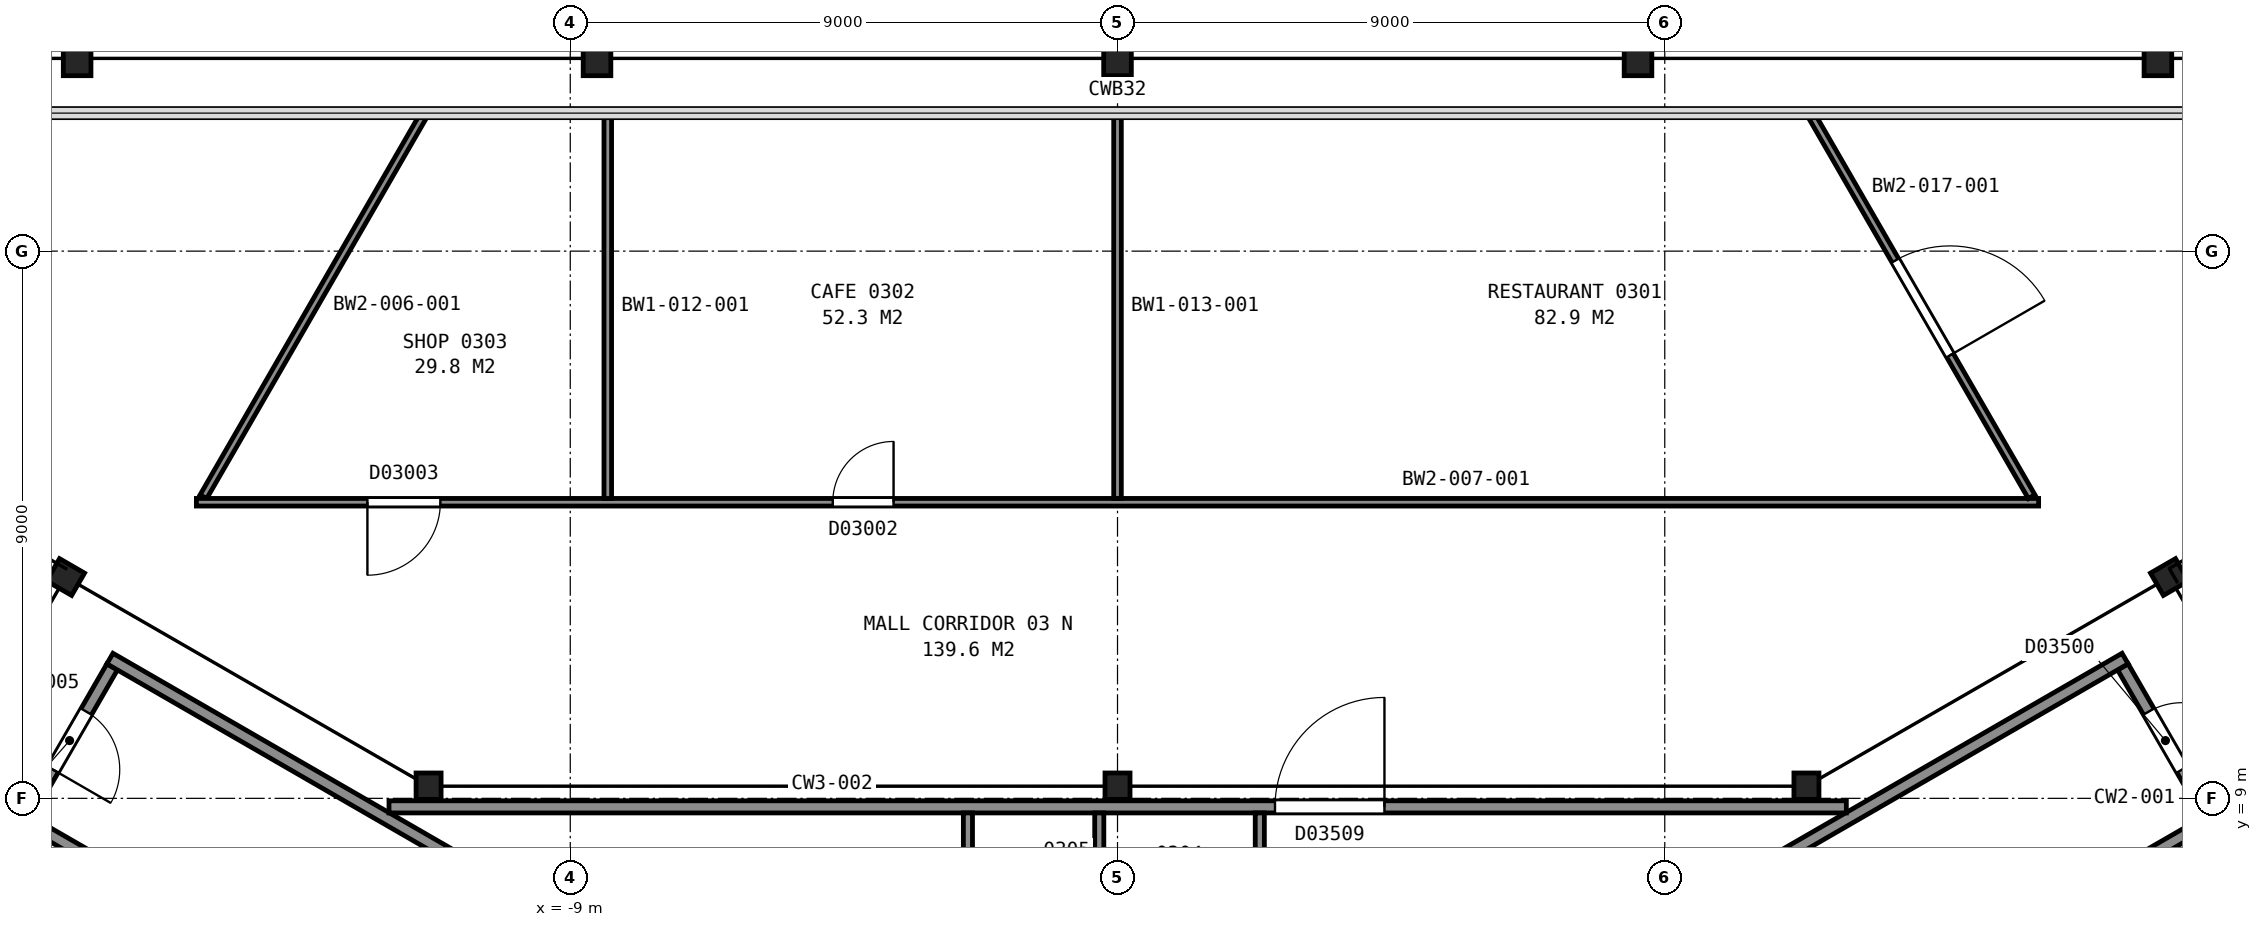
"""IFC4 building model, lengths in metres.
Left out: names, types, materials, properties, quantities, classifications, styles, units other than length and angle.
Written with IfcOpenShell. Run it as: python <this file> out.ifc"""

import sys

from ifc_helpers import new_model, si_unit, direction, frame, frame_2d, origin, origin_2d, place, context, subcontext, project, spatial, rectangle, i_section, extrude, element, fill, save


model = new_model("IFC4")
c1 = context("Model", 3, precision=1e-05, world=origin(), true_north=direction((0.0, 1.0)))
c2 = subcontext(c1, "Body", "Model", "MODEL_VIEW")
j1 = project(units=[si_unit("LENGTHUNIT", "METRE"), si_unit("PLANEANGLEUNIT", "RADIAN")], contexts=[c1])
p1 = place(None, origin())
s1 = spatial("IfcSite", under=j1, at=p1, CompositionType="ELEMENT")
p2 = place(p1, origin())
s2 = spatial("IfcBuilding", under=s1, at=p2, CompositionType="ELEMENT")
p3 = place(p2, frame((0.0, 0.0, 22.4)))
s3 = spatial("IfcBuildingStorey", under=s2, at=p3, CompositionType="ELEMENT", Elevation=22.4)
for number, where, z_axis, x_axis in (
    (1, (17.11, 21.17, 0.0), (0.0, 0.0, 1.0), (1.0, 0.0, 0.0)),
    (2, (8.56, 21.17, 0.0), (0.0, 0.0, 1.0), (1.0, 0.0, 0.0)),
    (3, (0.0, 21.17, 0.0), (0.0, 0.0, 1.0), (1.0, 0.0, 0.0)),
    (4, (-8.56, 21.17, 0.0), (0.0, 0.0, 1.0), (1.0, 0.0, 0.0)),
    (5, (-17.11, 21.17, 0.0), (0.0, 0.0, 1.0), (1.0, 0.0, 0.0)),
):
    element("IfcColumn", number, at=place(p3, frame(where, z_axis=z_axis, x_axis=x_axis)), inside=s3, PredefinedType="COLUMN", context=c2, shape_type="SweptSolid", body=[
        extrude(i_section(OverallWidth=0.455, OverallDepth=0.569, WebThickness=0.078, FlangeThickness=0.125, FilletRadius=0.015, at=origin_2d()), origin(), (0.0, 0.0, 1.0), 4.8),
    ])
p4 = place(p3, frame((17.3, 12.64, 0.0), z_axis=(0.0, 0.0, 1.0), x_axis=(0.5, -0.866025403784, 0.0)))
e6 = element("IfcColumn", 6, at=p4, inside=s3, PredefinedType="COLUMN", context=c2, shape_type="SweptSolid", body=[
    extrude(i_section(OverallWidth=0.424, OverallDepth=0.475, WebThickness=0.048, FlangeThickness=0.077, FilletRadius=0.015, at=origin_2d()), origin(), (0.0, 0.0, 1.0), 4.8),
])
for number, where, z_axis, x_axis in (
    (7, (11.33, 9.2, 0.0), (0.0, 0.0, 1.0), (1.0, 0.0, 0.0)),
    (8, (0.0, 9.2, 0.0), (0.0, 0.0, 1.0), (1.0, 0.0, 0.0)),
    (9, (-11.33, 9.2, 0.0), (0.0, 0.0, 1.0), (1.0, 0.0, 0.0)),
):
    element("IfcColumn", number, at=place(p3, frame(where, z_axis=z_axis, x_axis=x_axis)), inside=s3, PredefinedType="COLUMN", context=c2, shape_type="SweptSolid", body=[
        extrude(i_section(OverallWidth=0.411, OverallDepth=0.434, WebThickness=0.036, FlangeThickness=0.057, FilletRadius=0.015, at=origin_2d()), origin(), (0.0, 0.0, 1.0), 4.8),
    ])
p5 = place(p3, frame((-17.3, 12.64, 0.0), z_axis=(0.0, 0.0, 1.0), x_axis=(0.5, 0.866025403784, 0.0)))
e10 = element("IfcColumn", 10, at=p5, inside=s3, PredefinedType="COLUMN", context=c2, shape_type="SweptSolid", body=[
    extrude(i_section(OverallWidth=0.424, OverallDepth=0.475, WebThickness=0.048, FlangeThickness=0.077, FilletRadius=0.015, at=origin_2d()), origin(), (0.0, 0.0, 1.0), 4.8),
])
p6 = place(p3, frame((17.934, 8.738, 0.0), z_axis=(0.0, 0.0, 1.0), x_axis=(-0.49998411664, 0.866034573852, 0.0)))
e11 = element("IfcWall", 11, at=p6, inside=s3, PredefinedType="PARTITIONING", context=c2, shape_type="SweptSolid", body=[
    extrude(rectangle(XDim=2.8, YDim=0.2, at=frame_2d((1.4, 0.0))), origin(), (0.0, 0.0, 1.0), 4.55),
])
p7 = place(p6, frame((0.85, 0.0, 0.0)))
e12 = element("IfcOpeningElement", 12, at=p7, cuts=e11, PredefinedType="OPENING", context=c2, shape_type="SweptSolid", body=[
    extrude(rectangle(XDim=1.1, YDim=2.1, at=frame_2d((0.55, 1.05))), frame((0.0, 0.11, 0.0), z_axis=(0.0, -1.0, 0.0), x_axis=(1.0, 0.0, 0.0)), (0.0, 0.0, 1.0), 0.22),
])
for number, where, z_axis, x_axis in (
    (13, (6.178, 5.299, 0.0), (0.0, 0.0, 1.0), (0.866, 0.5, 0.0)),
    (14, (7.678, 2.701, 0.0), (0.0, 0.0, 1.0), (0.866, 0.5, 0.0)),
):
    element("IfcWall", number, at=place(p3, frame(where, z_axis=z_axis, x_axis=x_axis)), inside=s3, PredefinedType="PARTITIONING", context=c2, shape_type="SweptSolid", body=[
        extrude(rectangle(XDim=12.0, YDim=0.2, at=frame_2d((6.0, 0.0))), origin(), (0.0, 0.0, 1.0), 4.55),
    ])
p8 = place(p3, frame((-16.534, 11.162, 0.0), z_axis=(0.0, 0.0, 1.0), x_axis=(-0.49998411664, -0.866034573852, 0.0)))
e15 = element("IfcWall", 15, at=p8, inside=s3, PredefinedType="PARTITIONING", context=c2, shape_type="SweptSolid", body=[
    extrude(rectangle(XDim=2.8, YDim=0.2, at=frame_2d((1.4, 0.0))), origin(), (0.0, 0.0, 1.0), 4.55),
])
p9 = place(p8, frame((0.85, 0.0, 0.0)))
e16 = element("IfcOpeningElement", 16, at=p9, cuts=e15, PredefinedType="OPENING", context=c2, shape_type="SweptSolid", body=[
    extrude(rectangle(XDim=1.1, YDim=2.1, at=frame_2d((0.55, 1.05))), frame((0.0, 0.11, 0.0), z_axis=(0.0, -1.0, 0.0), x_axis=(1.0, 0.0, 0.0)), (0.0, 0.0, 1.0), 0.22),
])
for number, where, z_axis, x_axis in (
    (17, (-7.678, 2.701, 0.0), (0.0, 0.0, 1.0), (-0.866, 0.5, 0.0)),
    (18, (-6.178, 5.299, 0.0), (0.0, 0.0, 1.0), (-0.866, 0.5, 0.0)),
):
    element("IfcWall", number, at=place(p3, frame(where, z_axis=z_axis, x_axis=x_axis)), inside=s3, PredefinedType="PARTITIONING", context=c2, shape_type="SweptSolid", body=[
        extrude(rectangle(XDim=12.0, YDim=0.2, at=frame_2d((6.0, 0.0))), origin(), (0.0, 0.0, 1.0), 4.55),
    ])
p10 = place(p3, frame((11.986, 8.86, 0.0), z_axis=(0.0, 0.0, 1.0), x_axis=(-1.0, 0.0, 0.0)))
e19 = element("IfcWall", 19, at=p10, inside=s3, PredefinedType="PARTITIONING", context=c2, shape_type="SweptSolid", body=[
    extrude(rectangle(XDim=23.967, YDim=0.2, at=frame_2d((11.983, 0.0))), origin(), (0.0, 0.0, 1.0), 4.55),
])
p11 = place(p10, frame((7.596, 0.0, 0.0)))
e20 = element("IfcOpeningElement", 20, at=p11, cuts=e19, PredefinedType="OPENING", context=c2, shape_type="SweptSolid", body=[
    extrude(rectangle(XDim=1.8, YDim=2.1, at=frame_2d((0.9, 1.05))), frame((0.0, 0.11, 0.0), z_axis=(0.0, -1.0, 0.0), x_axis=(1.0, 0.0, 0.0)), (0.0, 0.0, 1.0), 0.22),
])
p12 = place(p3, frame((-2.46, 8.76, 0.0), z_axis=(0.0, 0.0, 1.0), x_axis=(0.0, -1.0, 0.0)))
e21 = element("IfcWall", 21, at=p12, inside=s3, PredefinedType="PARTITIONING", context=c2, shape_type="SweptSolid", body=[
    extrude(rectangle(XDim=2.125, YDim=0.15, at=frame_2d((1.062, 0.0))), origin(), (0.0, 0.0, 1.0), 4.55),
])
p13 = place(p12, frame((0.6, 0.0, 0.0)))
e22 = element("IfcOpeningElement", 22, at=p13, cuts=e21, PredefinedType="OPENING", context=c2, shape_type="SweptSolid", body=[
    extrude(rectangle(XDim=0.9, YDim=2.1, at=frame_2d((0.45, 1.05))), frame((0.0, 0.085, 0.0), z_axis=(0.0, -1.0, 0.0), x_axis=(1.0, 0.0, 0.0)), (0.0, 0.0, 1.0), 0.17),
])
for number, where, z_axis, x_axis in (
    (23, (-0.3, 6.635, 0.0), (0.0, 0.0, 1.0), (0.0, 1.0, 0.0)),
    (24, (2.34, 6.635, 0.0), (0.0, 0.0, 1.0), (0.0, 1.0, 0.0)),
):
    element("IfcWall", number, at=place(p3, frame(where, z_axis=z_axis, x_axis=x_axis)), inside=s3, PredefinedType="PARTITIONING", context=c2, shape_type="SweptSolid", body=[
        extrude(rectangle(XDim=2.125, YDim=0.15, at=frame_2d((1.062, 0.0))), origin(), (0.0, 0.0, 1.0), 4.55),
    ])
p14 = place(p3, frame((-15.033, 13.961, 0.0), z_axis=(0.0, 0.0, 1.0), x_axis=(0.499977739203, 0.86603825568, 0.0)))
e25 = element("IfcWall", 25, at=p14, inside=s3, PredefinedType="PARTITIONING", context=c2, shape_type="SweptSolid", body=[
    extrude(rectangle(XDim=7.285, YDim=0.125, at=frame_2d((3.643, 0.0))), origin(), (0.0, 0.0, 1.0), 4.64),
])
p15 = place(p3, frame((-15.148, 13.87, 0.0), z_axis=(0.0, 0.0, 1.0), x_axis=(1.0, 0.0, 0.0)))
e26 = element("IfcWall", 26, at=p15, inside=s3, PredefinedType="PARTITIONING", context=c2, shape_type="SweptSolid", body=[
    extrude(rectangle(XDim=30.297, YDim=0.125, at=frame_2d((15.148, 0.0))), origin(), (0.0, 0.0, 1.0), 3.653),
])
p16 = place(p15, frame((10.466, 0.0, 0.0)))
e27 = element("IfcOpeningElement", 27, at=p16, cuts=e26, PredefinedType="OPENING", context=c2, shape_type="SweptSolid", body=[
    extrude(rectangle(XDim=1.0, YDim=2.1, at=frame_2d((0.5, 1.05))), frame((0.0, 0.073, 0.0), z_axis=(0.0, -1.0, 0.0), x_axis=(1.0, 0.0, 0.0)), (0.0, 0.0, 1.0), 0.145),
])
p17 = place(p15, frame((2.812, 0.0, 0.0)))
e28 = element("IfcOpeningElement", 28, at=p17, cuts=e26, PredefinedType="OPENING", context=c2, shape_type="SweptSolid", body=[
    extrude(rectangle(XDim=1.2, YDim=2.1, at=frame_2d((0.6, 1.05))), frame((0.0, 0.073, 0.0), z_axis=(0.0, -1.0, 0.0), x_axis=(1.0, 0.0, 0.0)), (0.0, 0.0, 1.0), 0.145),
])
for number, where, z_axis, x_axis in (
    (29, (-8.383, 13.933, 0.0), (0.0, 0.0, 1.0), (0.0, 1.0, 0.0)),
    (30, (0.0, 13.933, 0.0), (0.0, 0.0, 1.0), (0.0, 1.0, 0.0)),
):
    element("IfcWall", number, at=place(p3, frame(where, z_axis=z_axis, x_axis=x_axis)), inside=s3, PredefinedType="PARTITIONING", context=c2, shape_type="SweptSolid", body=[
        extrude(rectangle(XDim=6.337, YDim=0.125, at=frame_2d((3.169, 0.0))), origin(), (0.0, 0.0, 1.0), 3.653),
    ])
p18 = place(p3, frame((15.033, 13.961, 0.0), z_axis=(0.0, 0.0, 1.0), x_axis=(-0.499977739203, 0.86603825568, 0.0)))
e31 = element("IfcWall", 31, at=p18, inside=s3, PredefinedType="PARTITIONING", context=c2, shape_type="SweptSolid", body=[
    extrude(rectangle(XDim=7.285, YDim=0.125, at=frame_2d((3.643, 0.0))), origin(), (0.0, 0.0, 1.0), 4.64),
])
p19 = place(p18, frame((2.685, 0.0, 0.0)))
e32 = element("IfcOpeningElement", 32, at=p19, cuts=e31, PredefinedType="OPENING", context=c2, shape_type="SweptSolid", body=[
    extrude(rectangle(XDim=1.8, YDim=2.4, at=frame_2d((0.9, 1.2))), frame((0.0, 0.073, 0.0), z_axis=(0.0, -1.0, 0.0), x_axis=(1.0, 0.0, 0.0)), (0.0, 0.0, 1.0), 0.145),
])
p20 = place(p7, origin())
e33 = element("IfcDoor", 33, at=p20, inside=s3, OperationType="SINGLE_SWING_LEFT", PredefinedType="DOOR", context=c2, shape_type="SweptSolid", body=[
    extrude(rectangle(XDim=1.1, YDim=2.1, at=frame_2d((0.55, 1.05))), frame((0.0, 0.025, 0.0), z_axis=(0.0, -1.0, 0.0), x_axis=(1.0, 0.0, 0.0)), (0.0, 0.0, 1.0), 0.05),
])
fill(e12, e33)
p21 = place(p9, origin())
e34 = element("IfcDoor", 34, at=p21, inside=s3, OperationType="SINGLE_SWING_RIGHT", PredefinedType="DOOR", context=c2, shape_type="SweptSolid", body=[
    extrude(rectangle(XDim=1.1, YDim=2.1, at=frame_2d((0.55, 1.05))), frame((0.0, 0.025, 0.0), z_axis=(0.0, -1.0, 0.0), x_axis=(1.0, 0.0, 0.0)), (0.0, 0.0, 1.0), 0.05),
])
fill(e16, e34)
p22 = place(p11, origin())
e35 = element("IfcDoor", 35, at=p22, inside=s3, OperationType="DOUBLE_DOOR_SINGLE_SWING", PredefinedType="DOOR", context=c2, shape_type="SweptSolid", body=[
    extrude(rectangle(XDim=1.8, YDim=2.1, at=frame_2d((0.9, 1.05))), frame((0.0, 0.025, 0.0), z_axis=(0.0, -1.0, 0.0), x_axis=(1.0, 0.0, 0.0)), (0.0, 0.0, 1.0), 0.05),
])
fill(e20, e35)
p23 = place(p16, origin())
e36 = element("IfcDoor", 36, at=p23, inside=s3, OperationType="SINGLE_SWING_RIGHT", PredefinedType="DOOR", context=c2, shape_type="SweptSolid", body=[
    extrude(rectangle(XDim=1.0, YDim=2.1, at=frame_2d((0.5, 1.05))), frame((0.0, 0.025, 0.0), z_axis=(0.0, -1.0, 0.0), x_axis=(1.0, 0.0, 0.0)), (0.0, 0.0, 1.0), 0.05),
])
fill(e27, e36)
p24 = place(p17, origin())
e37 = element("IfcDoor", 37, at=p24, inside=s3, OperationType="SINGLE_SWING_LEFT", PredefinedType="DOOR", context=c2, shape_type="SweptSolid", body=[
    extrude(rectangle(XDim=1.2, YDim=2.1, at=frame_2d((0.6, 1.05))), frame((0.0, 0.025, 0.0), z_axis=(0.0, -1.0, 0.0), x_axis=(1.0, 0.0, 0.0)), (0.0, 0.0, 1.0), 0.05),
])
fill(e28, e37)
p25 = place(p19, origin())
e38 = element("IfcDoor", 38, at=p25, inside=s3, OperationType="DOUBLE_DOOR_SINGLE_SWING", PredefinedType="DOOR", context=c2, shape_type="SweptSolid", body=[
    extrude(rectangle(XDim=1.8, YDim=2.4, at=frame_2d((0.9, 1.2))), frame((0.0, 0.025, 0.0), z_axis=(0.0, -1.0, 0.0), x_axis=(1.0, 0.0, 0.0)), (0.0, 0.0, 1.0), 0.05),
])
fill(e32, e38)
save(model, sys.argv[1])
